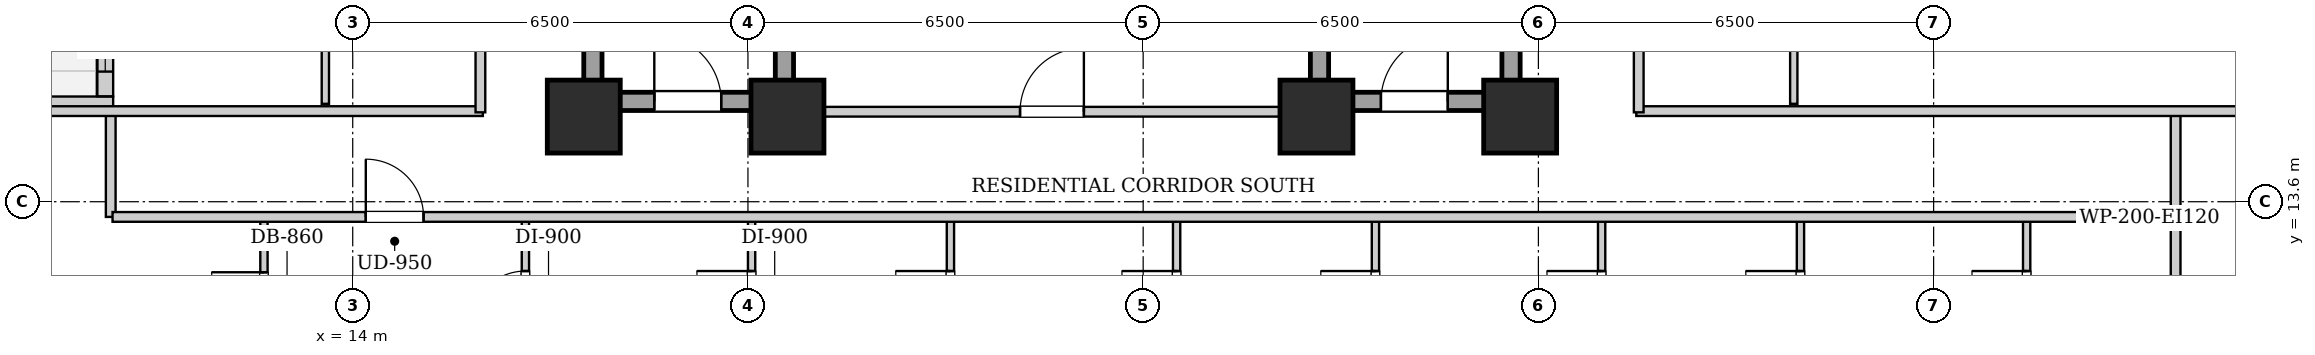
"""IFC4 building model, lengths in metres.
Left out: names, types, materials, properties, quantities, classifications, styles, units other than length and angle.
Written with IfcOpenShell. Run it as: python <this file> out.ifc"""

import sys

from ifc_helpers import new_model, si_unit, direction, frame, frame_2d, origin, origin_2d, place, context, subcontext, project, spatial, rectangle, extrude, element, fill, save


model = new_model("IFC4")
c1 = context("Model", 3, precision=1e-05, world=origin(), true_north=direction((0.0, 1.0)))
c2 = subcontext(c1, "Body", "Model", "MODEL_VIEW")
j1 = project(units=[si_unit("LENGTHUNIT", "METRE"), si_unit("PLANEANGLEUNIT", "RADIAN")], contexts=[c1])
p1 = place(None, origin())
s1 = spatial("IfcSite", under=j1, at=p1, CompositionType="ELEMENT")
p2 = place(p1, origin())
s2 = spatial("IfcBuilding", under=s1, at=p2, CompositionType="ELEMENT")
p3 = place(p2, frame((0.0, 0.0, 29.0)))
s3 = spatial("IfcBuildingStorey", under=s2, at=p3, CompositionType="ELEMENT", Elevation=29.0)
for number, where, z_axis, x_axis in (
    (1, (17.8, 15.0, 0.0), (0.0, 0.0, 1.0), (1.0, 0.0, 0.0)),
    (2, (21.15, 15.0, 0.0), (0.0, 0.0, 1.0), (1.0, 0.0, 0.0)),
    (3, (29.85, 15.0, 0.0), (0.0, 0.0, 1.0), (1.0, 0.0, 0.0)),
    (4, (33.2, 15.0, 0.0), (0.0, 0.0, 1.0), (1.0, 0.0, 0.0)),
):
    element("IfcColumn", number, at=place(p3, frame(where, z_axis=z_axis, x_axis=x_axis)), inside=s3, PredefinedType="COLUMN", context=c2, shape_type="SweptSolid", body=[
        extrude(rectangle(XDim=1.2, YDim=1.2, at=origin_2d()), origin(), (0.0, 0.0, 1.0), 3.2),
    ])
p4 = place(p3, frame((7.66, 15.2, 0.0), z_axis=(0.0, 0.0, 1.0), x_axis=(1.0, 0.0, 0.0)))
e5 = element("IfcWall", 5, at=p4, inside=s3, PredefinedType="SOLIDWALL", context=c2, shape_type="SweptSolid", body=[
    extrude(rectangle(XDim=2.4, YDim=0.26, at=frame_2d((1.2, 0.0))), origin(), (0.0, 0.0, 1.0), 2.94),
])
p5 = place(p3, frame((9.93, 15.334, 0.0), z_axis=(0.0, 0.0, 1.0), x_axis=(0.0, 1.0, 0.0)))
e6 = element("IfcWall", 6, at=p5, inside=s3, PredefinedType="SOLIDWALL", context=c2, shape_type="SweptSolid", body=[
    extrude(rectangle(XDim=3.932, YDim=0.26, at=frame_2d((1.966, 0.0))), origin(), (0.0, 0.0, 1.0), 2.94),
])
p6 = place(p5, frame((1.416, 0.0, 0.0)))
e7 = element("IfcOpeningElement", 7, at=p6, cuts=e6, PredefinedType="OPENING", context=c2, shape_type="SweptSolid", body=[
    extrude(rectangle(XDim=1.1, YDim=2.0, at=frame_2d((0.55, 1.0))), frame((0.0, 0.14, 0.0), z_axis=(0.0, -1.0, 0.0), x_axis=(1.0, 0.0, 0.0)), (0.0, 0.0, 1.0), 0.28),
])
p7 = place(p5, frame((0.406, 0.0, 0.55)))
e8 = element("IfcOpeningElement", 8, at=p7, cuts=e6, PredefinedType="OPENING", context=c2, shape_type="SweptSolid", body=[
    extrude(rectangle(XDim=0.85, YDim=1.2, at=frame_2d((0.425, 0.6))), frame((0.0, 0.14, 0.0), z_axis=(0.0, -1.0, 0.0), x_axis=(1.0, 0.0, 0.0)), (0.0, 0.0, 1.0), 0.28),
])
for number, where, z_axis, x_axis in (
    (9, (17.95, 15.1, 0.0), (0.0, 0.0, 1.0), (0.0, 1.0, 0.0)),
    (10, (21.1, 15.1, 0.0), (0.0, 0.0, 1.0), (0.0, 1.0, 0.0)),
):
    element("IfcWall", number, at=place(p3, frame(where, z_axis=z_axis, x_axis=x_axis)), inside=s3, PredefinedType="SHEAR", context=c2, shape_type="SweptSolid", body=[
        extrude(rectangle(XDim=9.0, YDim=0.3, at=frame_2d((4.5, 0.0))), origin(), (0.0, 0.0, 1.0), 2.94),
    ])
p8 = place(p3, frame((18.1, 15.25, 0.0), z_axis=(0.0, 0.0, 1.0), x_axis=(1.0, 0.0, 0.0)))
e11 = element("IfcWall", 11, at=p8, inside=s3, PredefinedType="SHEAR", context=c2, shape_type="SweptSolid", body=[
    extrude(rectangle(XDim=2.85, YDim=0.3, at=frame_2d((1.425, 0.0))), origin(), (0.0, 0.0, 1.0), 2.94),
])
p9 = place(p8, frame((0.86, 0.0, 0.0)))
e12 = element("IfcOpeningElement", 12, at=p9, cuts=e11, PredefinedType="OPENING", context=c2, shape_type="SweptSolid", body=[
    extrude(rectangle(XDim=1.1, YDim=2.05, at=frame_2d((0.55, 1.025))), frame((0.0, 0.16, 0.0), z_axis=(0.0, -1.0, 0.0), x_axis=(1.0, 0.0, 0.0)), (0.0, 0.0, 1.0), 0.32),
])
for number, where, z_axis, x_axis in (
    (13, (29.9, 15.1, 0.0), (0.0, 0.0, 1.0), (0.0, 1.0, 0.0)),
    (14, (33.05, 15.1, 0.0), (0.0, 0.0, 1.0), (0.0, 1.0, 0.0)),
):
    element("IfcWall", number, at=place(p3, frame(where, z_axis=z_axis, x_axis=x_axis)), inside=s3, PredefinedType="SHEAR", context=c2, shape_type="SweptSolid", body=[
        extrude(rectangle(XDim=9.0, YDim=0.3, at=frame_2d((4.5, 0.0))), origin(), (0.0, 0.0, 1.0), 2.94),
    ])
p10 = place(p3, frame((30.05, 15.25, 0.0), z_axis=(0.0, 0.0, 1.0), x_axis=(1.0, 0.0, 0.0)))
e15 = element("IfcWall", 15, at=p10, inside=s3, PredefinedType="SHEAR", context=c2, shape_type="SweptSolid", body=[
    extrude(rectangle(XDim=2.85, YDim=0.3, at=frame_2d((1.425, 0.0))), origin(), (0.0, 0.0, 1.0), 2.94),
])
p11 = place(p10, frame((0.86, 0.0, 0.0)))
e16 = element("IfcOpeningElement", 16, at=p11, cuts=e15, PredefinedType="OPENING", context=c2, shape_type="SweptSolid", body=[
    extrude(rectangle(XDim=1.1, YDim=2.05, at=frame_2d((0.55, 1.025))), frame((0.0, 0.16, 0.0), z_axis=(0.0, -1.0, 0.0), x_axis=(1.0, 0.0, 0.0)), (0.0, 0.0, 1.0), 0.32),
])
p12 = place(p3, frame((21.25, 15.08, 0.0), z_axis=(0.0, 0.0, 1.0), x_axis=(1.0, 0.0, 0.0)))
e17 = element("IfcWall", 17, at=p12, inside=s3, PredefinedType="PARTITIONING", context=c2, shape_type="SweptSolid", body=[
    extrude(rectangle(XDim=8.5, YDim=0.16, at=frame_2d((4.25, 0.0))), origin(), (0.0, 0.0, 1.0), 2.155),
])
p13 = place(p12, frame((3.725, 0.0, 0.0)))
e18 = element("IfcOpeningElement", 18, at=p13, cuts=e17, PredefinedType="OPENING", context=c2, shape_type="SweptSolid", body=[
    extrude(rectangle(XDim=1.05, YDim=2.05, at=frame_2d((0.525, 1.025))), frame((0.0, 0.09, 0.0), z_axis=(0.0, -1.0, 0.0), x_axis=(1.0, 0.0, 0.0)), (0.0, 0.0, 1.0), 0.18),
])
for number, where, z_axis, x_axis in (
    (19, (10.02, 13.35, 0.0), (0.0, 0.0, 1.0), (0.0, 1.0, 0.0)),
    (20, (43.98, 13.35, 0.0), (0.0, 0.0, 1.0), (0.0, 1.0, 0.0)),
):
    element("IfcWall", number, at=place(p3, frame(where, z_axis=z_axis, x_axis=x_axis)), inside=s3, PredefinedType="PARTITIONING", context=c2, shape_type="SweptSolid", body=[
        extrude(rectangle(XDim=1.74, YDim=0.16, at=frame_2d((0.87, 0.0))), origin(), (0.0, 0.0, 1.0), 2.94),
    ])
p14 = place(p3, frame((7.78, 15.09, 0.0), z_axis=(0.0, 0.0, 1.0), x_axis=(1.0, 0.0, 0.0)))
e21 = element("IfcWall", 21, at=p14, inside=s3, PredefinedType="PARTITIONING", context=c2, shape_type="SweptSolid", body=[
    extrude(rectangle(XDim=8.36, YDim=0.16, at=frame_2d((4.18, 0.0))), origin(), (0.0, 0.0, 1.0), 2.155),
])
p15 = place(p3, frame((35.11, 15.09, 0.0), z_axis=(0.0, 0.0, 1.0), x_axis=(1.0, 0.0, 0.0)))
e22 = element("IfcWall", 22, at=p15, inside=s3, PredefinedType="PARTITIONING", context=c2, shape_type="SweptSolid", body=[
    extrude(rectangle(XDim=11.11, YDim=0.16, at=frame_2d((5.555, 0.0))), origin(), (0.0, 0.0, 1.0), 2.155),
])
p16 = place(p3, frame((43.98, 10.65, 0.0), z_axis=(0.0, 0.0, 1.0), x_axis=(0.0, 1.0, 0.0)))
e23 = element("IfcWall", 23, at=p16, inside=s3, PredefinedType="PARTITIONING", context=c2, shape_type="SweptSolid", body=[
    extrude(rectangle(XDim=2.66, YDim=0.16, at=frame_2d((1.33, 0.0))), origin(), (0.0, 0.0, 1.0), 2.94),
])
p17 = place(p3, frame((12.54, 10.71, 0.0), z_axis=(0.0, 0.0, 1.0), x_axis=(0.0, 1.0, 0.0)))
e24 = element("IfcWall", 24, at=p17, inside=s3, PredefinedType="PARTITIONING", context=c2, shape_type="SweptSolid", body=[
    extrude(rectangle(XDim=2.6, YDim=0.12, at=frame_2d((1.3, 0.0))), origin(), (0.0, 0.0, 1.0), 2.94),
])
p18 = place(p17, frame((0.87, 0.0, 0.0)))
e25 = element("IfcOpeningElement", 25, at=p18, cuts=e24, PredefinedType="OPENING", context=c2, shape_type="SweptSolid", body=[
    extrude(rectangle(XDim=0.86, YDim=2.05, at=frame_2d((0.43, 1.025))), frame((0.0, 0.07, 0.0), z_axis=(0.0, -1.0, 0.0), x_axis=(1.0, 0.0, 0.0)), (0.0, 0.0, 1.0), 0.14),
])
p19 = place(p3, frame((16.84, 10.71, 0.0), z_axis=(0.0, 0.0, 1.0), x_axis=(0.0, 1.0, 0.0)))
e26 = element("IfcWall", 26, at=p19, inside=s3, PredefinedType="PARTITIONING", context=c2, shape_type="SweptSolid", body=[
    extrude(rectangle(XDim=2.6, YDim=0.12, at=frame_2d((1.3, 0.0))), origin(), (0.0, 0.0, 1.0), 2.94),
])
p20 = place(p19, frame((0.85, 0.0, 0.0)))
e27 = element("IfcOpeningElement", 27, at=p20, cuts=e26, PredefinedType="OPENING", context=c2, shape_type="SweptSolid", body=[
    extrude(rectangle(XDim=0.9, YDim=2.05, at=frame_2d((0.45, 1.025))), frame((0.0, 0.07, 0.0), z_axis=(0.0, -1.0, 0.0), x_axis=(1.0, 0.0, 0.0)), (0.0, 0.0, 1.0), 0.14),
])
p21 = place(p3, frame((20.56, 10.71, 0.0), z_axis=(0.0, 0.0, 1.0), x_axis=(0.0, 1.0, 0.0)))
e28 = element("IfcWall", 28, at=p21, inside=s3, PredefinedType="PARTITIONING", context=c2, shape_type="SweptSolid", body=[
    extrude(rectangle(XDim=2.6, YDim=0.12, at=frame_2d((1.3, 0.0))), origin(), (0.0, 0.0, 1.0), 2.94),
])
p22 = place(p21, frame((0.85, 0.0, 0.0)))
e29 = element("IfcOpeningElement", 29, at=p22, cuts=e28, PredefinedType="OPENING", context=c2, shape_type="SweptSolid", body=[
    extrude(rectangle(XDim=0.9, YDim=2.05, at=frame_2d((0.45, 1.025))), frame((0.0, 0.07, 0.0), z_axis=(0.0, -1.0, 0.0), x_axis=(1.0, 0.0, 0.0)), (0.0, 0.0, 1.0), 0.14),
])
p23 = place(p3, frame((23.83, 10.71, 0.0), z_axis=(0.0, 0.0, 1.0), x_axis=(0.0, 1.0, 0.0)))
e30 = element("IfcWall", 30, at=p23, inside=s3, PredefinedType="PARTITIONING", context=c2, shape_type="SweptSolid", body=[
    extrude(rectangle(XDim=2.6, YDim=0.12, at=frame_2d((1.3, 0.0))), origin(), (0.0, 0.0, 1.0), 2.94),
])
p24 = place(p23, frame((0.85, 0.0, 0.0)))
e31 = element("IfcOpeningElement", 31, at=p24, cuts=e30, PredefinedType="OPENING", context=c2, shape_type="SweptSolid", body=[
    extrude(rectangle(XDim=0.9, YDim=2.05, at=frame_2d((0.45, 1.025))), frame((0.0, 0.07, 0.0), z_axis=(0.0, -1.0, 0.0), x_axis=(1.0, 0.0, 0.0)), (0.0, 0.0, 1.0), 0.14),
])
p25 = place(p3, frame((27.55, 10.71, 0.0), z_axis=(0.0, 0.0, 1.0), x_axis=(0.0, 1.0, 0.0)))
e32 = element("IfcWall", 32, at=p25, inside=s3, PredefinedType="PARTITIONING", context=c2, shape_type="SweptSolid", body=[
    extrude(rectangle(XDim=2.6, YDim=0.12, at=frame_2d((1.3, 0.0))), origin(), (0.0, 0.0, 1.0), 2.94),
])
p26 = place(p25, frame((0.85, 0.0, 0.0)))
e33 = element("IfcOpeningElement", 33, at=p26, cuts=e32, PredefinedType="OPENING", context=c2, shape_type="SweptSolid", body=[
    extrude(rectangle(XDim=0.9, YDim=2.05, at=frame_2d((0.45, 1.025))), frame((0.0, 0.07, 0.0), z_axis=(0.0, -1.0, 0.0), x_axis=(1.0, 0.0, 0.0)), (0.0, 0.0, 1.0), 0.14),
])
p27 = place(p3, frame((30.82, 10.71, 0.0), z_axis=(0.0, 0.0, 1.0), x_axis=(0.0, 1.0, 0.0)))
e34 = element("IfcWall", 34, at=p27, inside=s3, PredefinedType="PARTITIONING", context=c2, shape_type="SweptSolid", body=[
    extrude(rectangle(XDim=2.6, YDim=0.12, at=frame_2d((1.3, 0.0))), origin(), (0.0, 0.0, 1.0), 2.94),
])
p28 = place(p27, frame((0.85, 0.0, 0.0)))
e35 = element("IfcOpeningElement", 35, at=p28, cuts=e34, PredefinedType="OPENING", context=c2, shape_type="SweptSolid", body=[
    extrude(rectangle(XDim=0.9, YDim=2.05, at=frame_2d((0.45, 1.025))), frame((0.0, 0.07, 0.0), z_axis=(0.0, -1.0, 0.0), x_axis=(1.0, 0.0, 0.0)), (0.0, 0.0, 1.0), 0.14),
])
p29 = place(p3, frame((34.54, 10.71, 0.0), z_axis=(0.0, 0.0, 1.0), x_axis=(0.0, 1.0, 0.0)))
e36 = element("IfcWall", 36, at=p29, inside=s3, PredefinedType="PARTITIONING", context=c2, shape_type="SweptSolid", body=[
    extrude(rectangle(XDim=2.6, YDim=0.12, at=frame_2d((1.3, 0.0))), origin(), (0.0, 0.0, 1.0), 2.94),
])
p30 = place(p29, frame((0.85, 0.0, 0.0)))
e37 = element("IfcOpeningElement", 37, at=p30, cuts=e36, PredefinedType="OPENING", context=c2, shape_type="SweptSolid", body=[
    extrude(rectangle(XDim=0.9, YDim=2.05, at=frame_2d((0.45, 1.025))), frame((0.0, 0.07, 0.0), z_axis=(0.0, -1.0, 0.0), x_axis=(1.0, 0.0, 0.0)), (0.0, 0.0, 1.0), 0.14),
])
p31 = place(p3, frame((37.81, 10.71, 0.0), z_axis=(0.0, 0.0, 1.0), x_axis=(0.0, 1.0, 0.0)))
e38 = element("IfcWall", 38, at=p31, inside=s3, PredefinedType="PARTITIONING", context=c2, shape_type="SweptSolid", body=[
    extrude(rectangle(XDim=2.6, YDim=0.12, at=frame_2d((1.3, 0.0))), origin(), (0.0, 0.0, 1.0), 2.94),
])
p32 = place(p31, frame((0.85, 0.0, 0.0)))
e39 = element("IfcOpeningElement", 39, at=p32, cuts=e38, PredefinedType="OPENING", context=c2, shape_type="SweptSolid", body=[
    extrude(rectangle(XDim=0.9, YDim=2.05, at=frame_2d((0.45, 1.025))), frame((0.0, 0.07, 0.0), z_axis=(0.0, -1.0, 0.0), x_axis=(1.0, 0.0, 0.0)), (0.0, 0.0, 1.0), 0.14),
])
p33 = place(p3, frame((41.53, 10.71, 0.0), z_axis=(0.0, 0.0, 1.0), x_axis=(0.0, 1.0, 0.0)))
e40 = element("IfcWall", 40, at=p33, inside=s3, PredefinedType="PARTITIONING", context=c2, shape_type="SweptSolid", body=[
    extrude(rectangle(XDim=2.6, YDim=0.12, at=frame_2d((1.3, 0.0))), origin(), (0.0, 0.0, 1.0), 2.94),
])
p34 = place(p33, frame((0.85, 0.0, 0.0)))
e41 = element("IfcOpeningElement", 41, at=p34, cuts=e40, PredefinedType="OPENING", context=c2, shape_type="SweptSolid", body=[
    extrude(rectangle(XDim=0.9, YDim=2.05, at=frame_2d((0.45, 1.025))), frame((0.0, 0.07, 0.0), z_axis=(0.0, -1.0, 0.0), x_axis=(1.0, 0.0, 0.0)), (0.0, 0.0, 1.0), 0.14),
])
for number, where, z_axis, x_axis in (
    (42, (13.55, 15.21, 0.0), (0.0, 0.0, 1.0), (0.0, 1.0, 0.0)),
    (43, (37.7, 15.21, 0.0), (0.0, 0.0, 1.0), (0.0, 1.0, 0.0)),
):
    element("IfcWall", number, at=place(p3, frame(where, z_axis=z_axis, x_axis=x_axis)), inside=s3, PredefinedType="PARTITIONING", context=c2, shape_type="SweptSolid", body=[
        extrude(rectangle(XDim=2.3, YDim=0.12, at=frame_2d((1.15, 0.0))), origin(), (0.0, 0.0, 1.0), 2.94),
    ])
p35 = place(p3, frame((10.05, 13.35, 0.0), z_axis=(0.0, 0.0, 1.0), x_axis=(1.0, 0.0, 0.0)))
e44 = element("IfcWall", 44, at=p35, inside=s3, PredefinedType="PARTITIONING", context=c2, shape_type="SweptSolid", body=[
    extrude(rectangle(XDim=33.9, YDim=0.16, at=frame_2d((16.95, 0.0))), origin(), (0.0, 0.0, 1.0), 2.94),
])
p36 = place(p35, frame((4.165, 0.0, 0.0)))
e45 = element("IfcOpeningElement", 45, at=p36, cuts=e44, PredefinedType="OPENING", context=c2, shape_type="SweptSolid", body=[
    extrude(rectangle(XDim=0.95, YDim=2.1, at=frame_2d((0.475, 1.05))), frame((0.0, 0.09, 0.0), z_axis=(0.0, -1.0, 0.0), x_axis=(1.0, 0.0, 0.0)), (0.0, 0.0, 1.0), 0.18),
])
p37 = place(p3, frame((16.1, 15.07, 0.0), z_axis=(0.0, 0.0, 1.0), x_axis=(0.0, 1.0, 0.0)))
e46 = element("IfcWall", 46, at=p37, inside=s3, PredefinedType="PARTITIONING", context=c2, shape_type="SweptSolid", body=[
    extrude(rectangle(XDim=13.93, YDim=0.16, at=frame_2d((6.965, 0.0))), origin(), (0.0, 0.0, 1.0), 2.94),
])
p38 = place(p37, frame((4.385, 0.0, 0.0)))
e47 = element("IfcOpeningElement", 47, at=p38, cuts=e46, PredefinedType="OPENING", context=c2, shape_type="SweptSolid", body=[
    extrude(rectangle(XDim=0.95, YDim=2.1, at=frame_2d((0.475, 1.05))), frame((0.0, 0.09, 0.0), z_axis=(0.0, -1.0, 0.0), x_axis=(1.0, 0.0, 0.0)), (0.0, 0.0, 1.0), 0.18),
])
p39 = place(p3, frame((35.15, 15.07, 0.0), z_axis=(0.0, 0.0, 1.0), x_axis=(0.0, 1.0, 0.0)))
e48 = element("IfcWall", 48, at=p39, inside=s3, PredefinedType="PARTITIONING", context=c2, shape_type="SweptSolid", body=[
    extrude(rectangle(XDim=13.93, YDim=0.16, at=frame_2d((6.965, 0.0))), origin(), (0.0, 0.0, 1.0), 2.94),
])
p40 = place(p39, frame((4.385, 0.0, 0.0)))
e49 = element("IfcOpeningElement", 49, at=p40, cuts=e48, PredefinedType="OPENING", context=c2, shape_type="SweptSolid", body=[
    extrude(rectangle(XDim=0.95, YDim=2.1, at=frame_2d((0.475, 1.05))), frame((0.0, 0.09, 0.0), z_axis=(0.0, -1.0, 0.0), x_axis=(1.0, 0.0, 0.0)), (0.0, 0.0, 1.0), 0.18),
])
p41 = place(p9, origin())
e50 = element("IfcDoor", 50, at=p41, inside=s3, OperationType="SINGLE_SWING_LEFT", PredefinedType="DOOR", context=c2, shape_type="SweptSolid", body=[
    extrude(rectangle(XDim=1.1, YDim=2.05, at=frame_2d((0.55, 1.025))), frame((0.0, 0.025, 0.0), z_axis=(0.0, -1.0, 0.0), x_axis=(1.0, 0.0, 0.0)), (0.0, 0.0, 1.0), 0.05),
])
fill(e12, e50)
p42 = place(p11, origin())
e51 = element("IfcDoor", 51, at=p42, inside=s3, OperationType="SINGLE_SWING_RIGHT", PredefinedType="DOOR", context=c2, shape_type="SweptSolid", body=[
    extrude(rectangle(XDim=1.1, YDim=2.05, at=frame_2d((0.55, 1.025))), frame((0.0, 0.025, 0.0), z_axis=(0.0, -1.0, 0.0), x_axis=(1.0, 0.0, 0.0)), (0.0, 0.0, 1.0), 0.05),
])
fill(e16, e51)
p43 = place(p13, origin())
e52 = element("IfcDoor", 52, at=p43, inside=s3, OperationType="SINGLE_SWING_RIGHT", PredefinedType="DOOR", context=c2, shape_type="SweptSolid", body=[
    extrude(rectangle(XDim=1.05, YDim=2.05, at=frame_2d((0.525, 1.025))), frame((0.0, 0.025, 0.0), z_axis=(0.0, -1.0, 0.0), x_axis=(1.0, 0.0, 0.0)), (0.0, 0.0, 1.0), 0.05),
])
fill(e18, e52)
p44 = place(p18, origin())
e53 = element("IfcDoor", 53, at=p44, inside=s3, OperationType="SINGLE_SWING_RIGHT", PredefinedType="DOOR", context=c2, shape_type="SweptSolid", body=[
    extrude(rectangle(XDim=0.86, YDim=2.05, at=frame_2d((0.43, 1.025))), frame((0.0, 0.025, 0.0), z_axis=(0.0, -1.0, 0.0), x_axis=(1.0, 0.0, 0.0)), (0.0, 0.0, 1.0), 0.05),
])
fill(e25, e53)
p45 = place(p20, origin())
e54 = element("IfcDoor", 54, at=p45, inside=s3, OperationType="SINGLE_SWING_LEFT", PredefinedType="DOOR", context=c2, shape_type="SweptSolid", body=[
    extrude(rectangle(XDim=0.9, YDim=2.05, at=frame_2d((0.45, 1.025))), frame((0.0, 0.025, 0.0), z_axis=(0.0, -1.0, 0.0), x_axis=(1.0, 0.0, 0.0)), (0.0, 0.0, 1.0), 0.05),
])
fill(e27, e54)
p46 = place(p22, origin())
e55 = element("IfcDoor", 55, at=p46, inside=s3, OperationType="SINGLE_SWING_RIGHT", PredefinedType="DOOR", context=c2, shape_type="SweptSolid", body=[
    extrude(rectangle(XDim=0.9, YDim=2.05, at=frame_2d((0.45, 1.025))), frame((0.0, 0.025, 0.0), z_axis=(0.0, -1.0, 0.0), x_axis=(1.0, 0.0, 0.0)), (0.0, 0.0, 1.0), 0.05),
])
fill(e29, e55)
p47 = place(p24, origin())
e56 = element("IfcDoor", 56, at=p47, inside=s3, OperationType="SINGLE_SWING_RIGHT", PredefinedType="DOOR", context=c2, shape_type="SweptSolid", body=[
    extrude(rectangle(XDim=0.9, YDim=2.05, at=frame_2d((0.45, 1.025))), frame((0.0, 0.025, 0.0), z_axis=(0.0, -1.0, 0.0), x_axis=(1.0, 0.0, 0.0)), (0.0, 0.0, 1.0), 0.05),
])
fill(e31, e56)
p48 = place(p26, origin())
e57 = element("IfcDoor", 57, at=p48, inside=s3, OperationType="SINGLE_SWING_RIGHT", PredefinedType="DOOR", context=c2, shape_type="SweptSolid", body=[
    extrude(rectangle(XDim=0.9, YDim=2.05, at=frame_2d((0.45, 1.025))), frame((0.0, 0.025, 0.0), z_axis=(0.0, -1.0, 0.0), x_axis=(1.0, 0.0, 0.0)), (0.0, 0.0, 1.0), 0.05),
])
fill(e33, e57)
p49 = place(p28, origin())
e58 = element("IfcDoor", 58, at=p49, inside=s3, OperationType="SINGLE_SWING_RIGHT", PredefinedType="DOOR", context=c2, shape_type="SweptSolid", body=[
    extrude(rectangle(XDim=0.9, YDim=2.05, at=frame_2d((0.45, 1.025))), frame((0.0, 0.025, 0.0), z_axis=(0.0, -1.0, 0.0), x_axis=(1.0, 0.0, 0.0)), (0.0, 0.0, 1.0), 0.05),
])
fill(e35, e58)
p50 = place(p30, origin())
e59 = element("IfcDoor", 59, at=p50, inside=s3, OperationType="SINGLE_SWING_RIGHT", PredefinedType="DOOR", context=c2, shape_type="SweptSolid", body=[
    extrude(rectangle(XDim=0.9, YDim=2.05, at=frame_2d((0.45, 1.025))), frame((0.0, 0.025, 0.0), z_axis=(0.0, -1.0, 0.0), x_axis=(1.0, 0.0, 0.0)), (0.0, 0.0, 1.0), 0.05),
])
fill(e37, e59)
p51 = place(p32, origin())
e60 = element("IfcDoor", 60, at=p51, inside=s3, OperationType="SINGLE_SWING_RIGHT", PredefinedType="DOOR", context=c2, shape_type="SweptSolid", body=[
    extrude(rectangle(XDim=0.9, YDim=2.05, at=frame_2d((0.45, 1.025))), frame((0.0, 0.025, 0.0), z_axis=(0.0, -1.0, 0.0), x_axis=(1.0, 0.0, 0.0)), (0.0, 0.0, 1.0), 0.05),
])
fill(e39, e60)
p52 = place(p34, origin())
e61 = element("IfcDoor", 61, at=p52, inside=s3, OperationType="SINGLE_SWING_RIGHT", PredefinedType="DOOR", context=c2, shape_type="SweptSolid", body=[
    extrude(rectangle(XDim=0.9, YDim=2.05, at=frame_2d((0.45, 1.025))), frame((0.0, 0.025, 0.0), z_axis=(0.0, -1.0, 0.0), x_axis=(1.0, 0.0, 0.0)), (0.0, 0.0, 1.0), 0.05),
])
fill(e41, e61)
p53 = place(p36, origin())
e62 = element("IfcDoor", 62, at=p53, inside=s3, OperationType="SINGLE_SWING_LEFT", PredefinedType="DOOR", context=c2, shape_type="SweptSolid", body=[
    extrude(rectangle(XDim=0.95, YDim=2.1, at=frame_2d((0.475, 1.05))), frame((0.0, 0.025, 0.0), z_axis=(0.0, -1.0, 0.0), x_axis=(1.0, 0.0, 0.0)), (0.0, 0.0, 1.0), 0.05),
])
fill(e45, e62)
p54 = place(p7, origin())
e63 = element("IfcWindow", 63, at=p54, inside=s3, PartitioningType="SINGLE_PANEL", PredefinedType="WINDOW", context=c2, shape_type="SweptSolid", body=[
    extrude(rectangle(XDim=0.85, YDim=1.2, at=frame_2d((0.425, 0.6))), frame((0.0, 0.03, 0.0), z_axis=(0.0, -1.0, 0.0), x_axis=(1.0, 0.0, 0.0)), (0.0, 0.0, 1.0), 0.06),
])
fill(e8, e63)
save(model, sys.argv[1])
